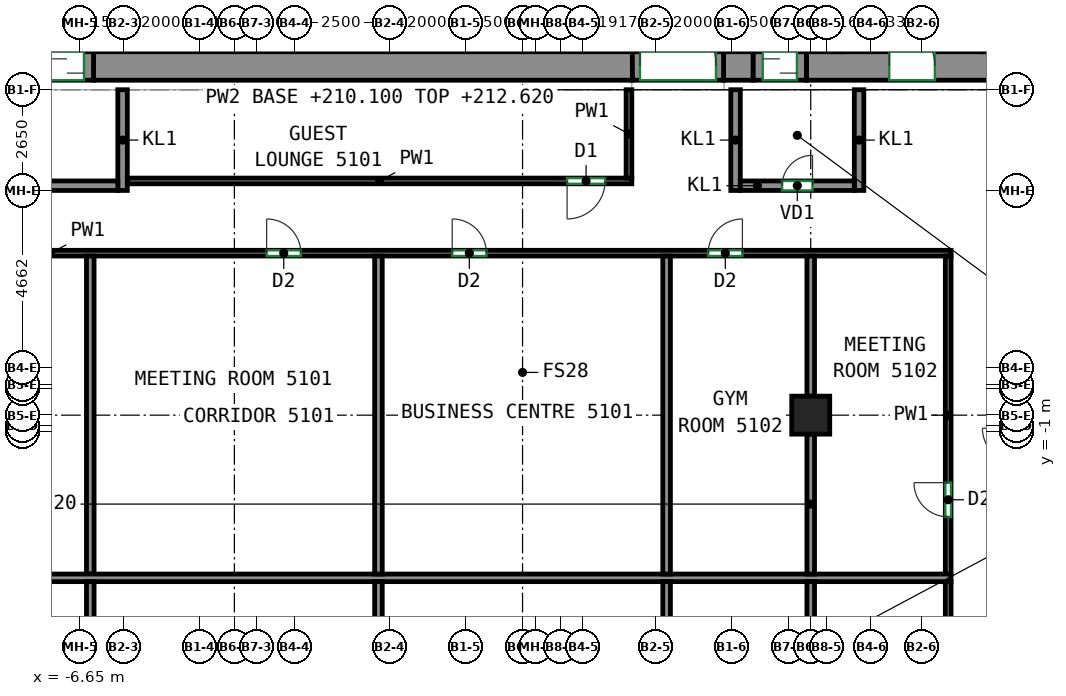
"""IFC4 building model, lengths in metres.
Left out: names, types, materials, properties, quantities, classifications, styles, units other than length and angle.
Written with IfcOpenShell. Run it as: python <this file> out.ifc"""

import sys

from ifc_helpers import new_model, si_unit, direction, frame, frame_2d, origin, origin_2d, place, context, subcontext, project, spatial, rectangle, extrude, source, transform, mapped, element, fill, save


model = new_model("IFC4")
c1 = context("Model", 3, precision=1e-05, world=origin(), true_north=direction((0.0, 1.0)))
c2 = subcontext(c1, "Body", "Model", "MODEL_VIEW")
j1 = project(units=[si_unit("LENGTHUNIT", "METRE"), si_unit("PLANEANGLEUNIT", "RADIAN")], contexts=[c1])
p1 = place(None, origin())
s1 = spatial("IfcSite", under=j1, at=p1, CompositionType="ELEMENT")
p2 = place(p1, origin())
s2 = spatial("IfcBuilding", under=s1, at=p2, CompositionType="ELEMENT")
p3 = place(p2, frame((0.0, 0.0, 210.1)))
s3 = spatial("IfcBuildingStorey", under=s2, at=p3, CompositionType="ELEMENT", Elevation=210.1)
m1 = source(origin(), c2, "Body", "SweptSolid", [
    extrude(rectangle(XDim=1.0, YDim=1.0, at=origin_2d()), origin(), (0.0, 0.0, 1.0), 3.12),
])
p4 = place(p3, frame((12.583, -0.562, 0.0), z_axis=(0.0, 0.0, 1.0), x_axis=(1.0, 0.0, 0.0)))
e1 = element("IfcColumn", 1, at=p4, inside=s3, PredefinedType="COLUMN", context=c2, shape_type="MappedRepresentation", body=[
    mapped(m1, transform((0.0, 0.0, 0.0))),
])
m2 = source(origin(), c2, "Body", "SweptSolid", [
    extrude(rectangle(XDim=14.18, YDim=0.75, at=frame_2d((7.09, 0.0))), origin(), (0.0, 0.0, 1.0), 3.12),
])
p5 = place(p3, frame((-6.29, 8.625, 0.0), z_axis=(0.0, 0.0, 1.0), x_axis=(1.0, 0.0, 0.0)))
e2 = element("IfcWall", 2, at=p5, inside=s3, PredefinedType="SHEAR", context=c2, shape_type="MappedRepresentation", body=[
    mapped(m2, transform((0.0, 0.0, 0.0))),
])
m3 = source(origin(), c2, "Body", "SweptSolid", [
    extrude(rectangle(XDim=0.78, YDim=0.75, at=frame_2d((0.39, 0.0))), origin(), (0.0, 0.0, 1.0), 3.12),
])
p6 = place(p3, frame((10.29, 8.625, 0.0), z_axis=(0.0, 0.0, 1.0), x_axis=(1.0, 0.0, 0.0)))
e3 = element("IfcWall", 3, at=p6, inside=s3, PredefinedType="SHEAR", context=c2, shape_type="MappedRepresentation", body=[
    mapped(m3, transform((0.0, 0.0, 0.0))),
])
m4 = source(origin(), c2, "Body", "SweptSolid", [
    extrude(rectangle(XDim=5.38, YDim=0.75, at=frame_2d((2.69, 0.0))), origin(), (0.0, 0.0, 1.0), 3.12),
])
p7 = place(p3, frame((12.47, 8.625, 0.0), z_axis=(0.0, 0.0, 1.0), x_axis=(1.0, 0.0, 0.0)))
e4 = element("IfcWall", 4, at=p7, inside=s3, PredefinedType="SHEAR", context=c2, shape_type="MappedRepresentation", body=[
    mapped(m4, transform((0.0, 0.0, 0.0))),
])
p8 = place(p7, frame((2.18, 0.0, 0.0)))
e5 = element("IfcOpeningElement", 5, at=p8, cuts=e4, PredefinedType="OPENING", context=c2, shape_type="SweptSolid", body=[
    extrude(rectangle(XDim=1.2, YDim=2.1, at=frame_2d((0.6, 1.05))), frame((0.0, 0.385, 0.0), z_axis=(0.0, -1.0, 0.0), x_axis=(1.0, 0.0, 0.0)), (0.0, 0.0, 1.0), 0.77),
])
m5 = source(origin(), c2, "Body", "SweptSolid", [
    extrude(rectangle(XDim=2.65, YDim=0.25, at=frame_2d((1.325, 0.0))), origin(), (0.0, 0.0, 1.0), 3.12),
])
p9 = place(p3, frame((-5.525, 5.35, 0.0), z_axis=(0.0, 0.0, 1.0), x_axis=(0.0, 1.0, 0.0)))
e6 = element("IfcWall", 6, at=p9, inside=s3, PredefinedType="PARTITIONING", context=c2, shape_type="MappedRepresentation", body=[
    mapped(m5, transform((0.0, 0.0, 0.0))),
])
m6 = source(origin(), c2, "Body", "SweptSolid", [
    extrude(rectangle(XDim=5.36, YDim=0.25, at=frame_2d((2.68, 0.0))), origin(), (0.0, 0.0, 1.0), 3.12),
])
p10 = place(p3, frame((-11.01, 5.475, 0.0), z_axis=(0.0, 0.0, 1.0), x_axis=(1.0, 0.0, 0.0)))
e7 = element("IfcWall", 7, at=p10, inside=s3, PredefinedType="PARTITIONING", context=c2, shape_type="MappedRepresentation", body=[
    mapped(m6, transform((0.0, 0.0, 0.0))),
])
p11 = place(p10, frame((2.28, 0.0, 0.0)))
e8 = element("IfcOpeningElement", 8, at=p11, cuts=e7, PredefinedType="OPENING", context=c2, shape_type="SweptSolid", body=[
    extrude(rectangle(XDim=0.8, YDim=2.0, at=frame_2d((0.4, 1.0))), frame((0.0, 0.135, 0.0), z_axis=(0.0, -1.0, 0.0), x_axis=(1.0, 0.0, 0.0)), (0.0, 0.0, 1.0), 0.27),
])
for number, where, z_axis, x_axis in (
    (9, (10.605, 5.35, 0.0), (0.0, 0.0, 1.0), (0.0, 1.0, 0.0)),
    (10, (13.855, 5.35, 0.0), (0.0, 0.0, 1.0), (0.0, 1.0, 0.0)),
):
    element("IfcWall", number, at=place(p3, frame(where, z_axis=z_axis, x_axis=x_axis)), inside=s3, PredefinedType="PARTITIONING", context=c2, shape_type="MappedRepresentation", body=[
        mapped(m5, transform((0.0, 0.0, 0.0))),
    ])
m7 = source(origin(), c2, "Body", "SweptSolid", [
    extrude(rectangle(XDim=3.0, YDim=0.25, at=frame_2d((1.5, 0.0))), origin(), (0.0, 0.0, 1.0), 3.12),
])
p12 = place(p3, frame((10.73, 5.475, 0.0), z_axis=(0.0, 0.0, 1.0), x_axis=(1.0, 0.0, 0.0)))
e11 = element("IfcWall", 11, at=p12, inside=s3, PredefinedType="PARTITIONING", context=c2, shape_type="MappedRepresentation", body=[
    mapped(m7, transform((0.0, 0.0, 0.0))),
])
p13 = place(p12, frame((1.1, 0.0, 0.0)))
e12 = element("IfcOpeningElement", 12, at=p13, cuts=e11, PredefinedType="OPENING", context=c2, shape_type="SweptSolid", body=[
    extrude(rectangle(XDim=0.8, YDim=2.0, at=frame_2d((0.4, 1.0))), frame((0.0, 0.135, 0.0), z_axis=(0.0, -1.0, 0.0), x_axis=(1.0, 0.0, 0.0)), (0.0, 0.0, 1.0), 0.27),
])
m8 = source(origin(), c2, "Body", "SweptSolid", [
    extrude(rectangle(XDim=1.4, YDim=0.75, at=frame_2d((0.7, 0.0))), origin(), (0.0, 0.0, 1.0), 2.7),
])
p14 = place(p3, frame((-7.69, 8.625, 0.0), z_axis=(0.0, 0.0, 1.0), x_axis=(1.0, 0.0, 0.0)))
e13 = element("IfcWall", 13, at=p14, inside=s3, PredefinedType="PARTITIONING", context=c2, shape_type="MappedRepresentation", body=[
    mapped(m8, transform((0.0, 0.0, 0.0))),
])
p15 = place(p14, frame((0.25, 0.0, 0.0)))
e14 = element("IfcOpeningElement", 14, at=p15, cuts=e13, PredefinedType="OPENING", context=c2, shape_type="SweptSolid", body=[
    extrude(rectangle(XDim=0.9, YDim=2.1, at=frame_2d((0.45, 1.05))), frame((0.0, 0.385, 0.0), z_axis=(0.0, -1.0, 0.0), x_axis=(1.0, 0.0, 0.0)), (0.0, 0.0, 1.0), 0.77),
])
m9 = source(origin(), c2, "Body", "SweptSolid", [
    extrude(rectangle(XDim=2.4, YDim=0.75, at=frame_2d((1.2, 0.0))), origin(), (0.0, 0.0, 1.0), 2.7),
])
p16 = place(p3, frame((7.89, 8.625, 0.0), z_axis=(0.0, 0.0, 1.0), x_axis=(1.0, 0.0, 0.0)))
e15 = element("IfcWall", 15, at=p16, inside=s3, PredefinedType="PARTITIONING", context=c2, shape_type="MappedRepresentation", body=[
    mapped(m9, transform((0.0, 0.0, 0.0))),
])
p17 = place(p16, frame((0.2, 0.0, 0.0)))
e16 = element("IfcOpeningElement", 16, at=p17, cuts=e15, PredefinedType="OPENING", context=c2, shape_type="SweptSolid", body=[
    extrude(rectangle(XDim=2.0, YDim=2.1, at=frame_2d((1.0, 1.05))), frame((0.0, 0.385, 0.0), z_axis=(0.0, -1.0, 0.0), x_axis=(1.0, 0.0, 0.0)), (0.0, 0.0, 1.0), 0.77),
])
p18 = place(p3, frame((11.07, 8.625, 0.0), z_axis=(0.0, 0.0, 1.0), x_axis=(1.0, 0.0, 0.0)))
e17 = element("IfcWall", 17, at=p18, inside=s3, PredefinedType="PARTITIONING", context=c2, shape_type="MappedRepresentation", body=[
    mapped(m8, transform((0.0, 0.0, 0.0))),
])
p19 = place(p18, frame((0.25, 0.0, 0.0)))
e18 = element("IfcOpeningElement", 18, at=p19, cuts=e17, PredefinedType="OPENING", context=c2, shape_type="SweptSolid", body=[
    extrude(rectangle(XDim=0.9, YDim=2.1, at=frame_2d((0.45, 1.05))), frame((0.0, 0.385, 0.0), z_axis=(0.0, -1.0, 0.0), x_axis=(1.0, 0.0, 0.0)), (0.0, 0.0, 1.0), 0.77),
])
p20 = place(p3, frame((7.875, 5.6, 0.0), z_axis=(0.0, 0.0, 1.0), x_axis=(-1.0, 0.0, 0.0)))
e19 = element("IfcWall", 19, at=p20, inside=s3, PredefinedType="PARTITIONING", context=c2, shape_type="SweptSolid", body=[
    extrude(rectangle(XDim=13.275, YDim=0.15, at=frame_2d((6.637, 0.0))), origin(), (0.0, 0.0, 1.0), 3.12),
])
p21 = place(p20, frame((0.703, 0.0, 0.0)))
e20 = element("IfcOpeningElement", 20, at=p21, cuts=e19, PredefinedType="OPENING", context=c2, shape_type="SweptSolid", body=[
    extrude(rectangle(XDim=1.0, YDim=2.1, at=frame_2d((0.5, 1.05))), frame((0.0, 0.085, 0.0), z_axis=(0.0, -1.0, 0.0), x_axis=(1.0, 0.0, 0.0)), (0.0, 0.0, 1.0), 0.17),
])
p22 = place(p3, frame((7.8, 8.0, 0.0), z_axis=(0.0, 0.0, 1.0), x_axis=(0.0, -1.0, 0.0)))
e21 = element("IfcWall", 21, at=p22, inside=s3, PredefinedType="PARTITIONING", context=c2, shape_type="SweptSolid", body=[
    extrude(rectangle(XDim=2.325, YDim=0.15, at=frame_2d((1.163, 0.0))), origin(), (0.0, 0.0, 1.0), 3.12),
])
p23 = place(p3, frame((-17.575, 3.7, 0.0), z_axis=(0.0, 0.0, 1.0), x_axis=(1.0, 0.0, 0.0)))
e22 = element("IfcWall", 22, at=p23, inside=s3, PredefinedType="PARTITIONING", context=c2, shape_type="SweptSolid", body=[
    extrude(rectangle(XDim=33.85, YDim=0.15, at=frame_2d((16.925, 0.0))), origin(), (0.0, 0.0, 1.0), 3.12),
])
p24 = place(p23, frame((1.902, 0.0, 0.0)))
e23 = element("IfcOpeningElement", 23, at=p24, cuts=e22, PredefinedType="OPENING", context=c2, shape_type="SweptSolid", body=[
    extrude(rectangle(XDim=0.9, YDim=2.1, at=frame_2d((0.45, 1.05))), frame((0.0, 0.085, 0.0), z_axis=(0.0, -1.0, 0.0), x_axis=(1.0, 0.0, 0.0)), (0.0, 0.0, 1.0), 0.17),
])
p25 = place(p23, frame((15.841, 0.0, 0.0)))
e24 = element("IfcOpeningElement", 24, at=p25, cuts=e22, PredefinedType="OPENING", context=c2, shape_type="SweptSolid", body=[
    extrude(rectangle(XDim=0.9, YDim=2.1, at=frame_2d((0.45, 1.05))), frame((0.0, 0.085, 0.0), z_axis=(0.0, -1.0, 0.0), x_axis=(1.0, 0.0, 0.0)), (0.0, 0.0, 1.0), 0.17),
])
p26 = place(p23, frame((20.724, 0.0, 0.0)))
e25 = element("IfcOpeningElement", 25, at=p26, cuts=e22, PredefinedType="OPENING", context=c2, shape_type="SweptSolid", body=[
    extrude(rectangle(XDim=0.9, YDim=2.1, at=frame_2d((0.45, 1.05))), frame((0.0, 0.085, 0.0), z_axis=(0.0, -1.0, 0.0), x_axis=(1.0, 0.0, 0.0)), (0.0, 0.0, 1.0), 0.17),
])
p27 = place(p23, frame((27.46, 0.0, 0.0)))
e26 = element("IfcOpeningElement", 26, at=p27, cuts=e22, PredefinedType="OPENING", context=c2, shape_type="SweptSolid", body=[
    extrude(rectangle(XDim=0.9, YDim=2.1, at=frame_2d((0.45, 1.05))), frame((0.0, 0.085, 0.0), z_axis=(0.0, -1.0, 0.0), x_axis=(1.0, 0.0, 0.0)), (0.0, 0.0, 1.0), 0.17),
])
p28 = place(p3, frame((16.2, -4.753, 0.0), z_axis=(0.0, 0.0, 1.0), x_axis=(0.0, 1.0, 0.0)))
e27 = element("IfcWall", 27, at=p28, inside=s3, PredefinedType="PARTITIONING", context=c2, shape_type="SweptSolid", body=[
    extrude(rectangle(XDim=8.378, YDim=0.15, at=frame_2d((4.189, 0.0))), origin(), (0.0, 0.0, 1.0), 3.12),
])
p29 = place(p28, frame((1.514, 0.0, 0.0)))
e28 = element("IfcOpeningElement", 28, at=p29, cuts=e27, PredefinedType="OPENING", context=c2, shape_type="SweptSolid", body=[
    extrude(rectangle(XDim=0.9, YDim=2.1, at=frame_2d((0.45, 1.05))), frame((0.0, 0.085, 0.0), z_axis=(0.0, -1.0, 0.0), x_axis=(1.0, 0.0, 0.0)), (0.0, 0.0, 1.0), 0.17),
])
p30 = place(p3, frame((16.2, -15.425, 0.0), z_axis=(0.0, 0.0, 1.0), x_axis=(0.0, 1.0, 0.0)))
e29 = element("IfcWall", 29, at=p30, inside=s3, PredefinedType="PARTITIONING", context=c2, shape_type="SweptSolid", body=[
    extrude(rectangle(XDim=10.492, YDim=0.15, at=frame_2d((5.246, 0.0))), origin(), (0.0, 0.0, 1.0), 3.12),
])
p31 = place(p30, frame((8.584, 0.0, 0.0)))
e30 = element("IfcOpeningElement", 30, at=p31, cuts=e29, PredefinedType="OPENING", context=c2, shape_type="SweptSolid", body=[
    extrude(rectangle(XDim=0.9, YDim=2.1, at=frame_2d((0.45, 1.05))), frame((0.0, 0.085, 0.0), z_axis=(0.0, -1.0, 0.0), x_axis=(1.0, 0.0, 0.0)), (0.0, 0.0, 1.0), 0.17),
])
p32 = place(p3, frame((-6.375, -4.743, 0.0), z_axis=(0.0, 0.0, 1.0), x_axis=(0.0, 1.0, 0.0)))
e31 = element("IfcWall", 31, at=p32, inside=s3, PredefinedType="PARTITIONING", context=c2, shape_type="SweptSolid", body=[
    extrude(rectangle(XDim=8.366, YDim=0.2, at=frame_2d((4.183, 0.0))), origin(), (0.0, 0.0, 1.0), 3.12),
])
p33 = place(p3, frame((-13.873, -4.843, 0.0), z_axis=(0.0, 0.0, 1.0), x_axis=(1.0, 0.0, 0.0)))
e32 = element("IfcWall", 32, at=p33, inside=s3, PredefinedType="PARTITIONING", context=c2, shape_type="SweptSolid", body=[
    extrude(rectangle(XDim=30.146, YDim=0.2, at=frame_2d((15.073, 0.0))), origin(), (0.0, 0.0, 1.0), 3.12),
])
for number, where, z_axis, x_axis in (
    (33, (1.208, -4.743, 0.0), (0.0, 0.0, 1.0), (0.0, 1.0, 0.0)),
    (34, (8.791, -4.743, 0.0), (0.0, 0.0, 1.0), (0.0, 1.0, 0.0)),
):
    element("IfcWall", number, at=place(p3, frame(where, z_axis=z_axis, x_axis=x_axis)), inside=s3, PredefinedType="PARTITIONING", context=c2, shape_type="SweptSolid", body=[
        extrude(rectangle(XDim=8.366, YDim=0.2, at=frame_2d((4.183, 0.0))), origin(), (0.0, 0.0, 1.0), 3.12),
    ])
p34 = place(p3, frame((12.583, -0.062, 0.0), z_axis=(0.0, 0.0, 1.0), x_axis=(0.0, 1.0, 0.0)))
e35 = element("IfcWall", 35, at=p34, inside=s3, PredefinedType="PARTITIONING", context=c2, shape_type="SweptSolid", body=[
    extrude(rectangle(XDim=3.685, YDim=0.2, at=frame_2d((1.843, 0.0))), origin(), (0.0, 0.0, 1.0), 3.12),
])
p35 = place(p3, frame((12.583, -4.743, 0.0), z_axis=(0.0, 0.0, 1.0), x_axis=(0.0, 1.0, 0.0)))
e36 = element("IfcWall", 36, at=p35, inside=s3, PredefinedType="PARTITIONING", context=c2, shape_type="SweptSolid", body=[
    extrude(rectangle(XDim=3.681, YDim=0.2, at=frame_2d((1.84, 0.0))), origin(), (0.0, 0.0, 1.0), 2.52),
])
for number, where, z_axis, x_axis in (
    (37, (-6.375, -15.423, 0.0), (0.0, 0.0, 1.0), (0.0, 1.0, 0.0)),
    (38, (1.208, -15.423, 0.0), (0.0, 0.0, 1.0), (0.0, 1.0, 0.0)),
    (39, (8.791, -15.423, 0.0), (0.0, 0.0, 1.0), (0.0, 1.0, 0.0)),
):
    element("IfcWall", number, at=place(p3, frame(where, z_axis=z_axis, x_axis=x_axis)), inside=s3, PredefinedType="PARTITIONING", context=c2, shape_type="SweptSolid", body=[
        extrude(rectangle(XDim=10.48, YDim=0.2, at=frame_2d((5.24, 0.0))), origin(), (0.0, 0.0, 1.0), 3.12),
    ])
p36 = place(p3, frame((12.583, -8.625, 0.0), z_axis=(0.0, 0.0, 1.0), x_axis=(0.0, 1.0, 0.0)))
e40 = element("IfcWall", 40, at=p36, inside=s3, PredefinedType="PARTITIONING", context=c2, shape_type="SweptSolid", body=[
    extrude(rectangle(XDim=3.682, YDim=0.2, at=frame_2d((1.841, 0.0))), origin(), (0.0, 0.0, 1.0), 2.52),
])
p37 = place(p17, origin())
e41 = element("IfcDoor", 41, at=p37, inside=s3, OperationType="DOUBLE_DOOR_SINGLE_SWING", PredefinedType="DOOR", context=c2, shape_type="SweptSolid", body=[
    extrude(rectangle(XDim=2.0, YDim=2.1, at=frame_2d((1.0, 1.05))), frame((0.0, 0.28, 0.0), z_axis=(0.0, -1.0, 0.0), x_axis=(1.0, 0.0, 0.0)), (0.0, 0.0, 1.0), 0.05),
])
fill(e16, e41)
p38 = place(p13, origin())
e42 = element("IfcDoor", 42, at=p38, inside=s3, OperationType="SINGLE_SWING_RIGHT", PredefinedType="DOOR", context=c2, shape_type="SweptSolid", body=[
    extrude(rectangle(XDim=0.8, YDim=2.0, at=frame_2d((0.4, 1.0))), frame((0.0, 0.025, 0.0), z_axis=(0.0, -1.0, 0.0), x_axis=(1.0, 0.0, 0.0)), (0.0, 0.0, 1.0), 0.05),
])
fill(e12, e42)
p39 = place(p15, origin())
e43 = element("IfcDoor", 43, at=p39, inside=s3, OperationType="SLIDING_TO_RIGHT", PredefinedType="DOOR", context=c2, shape_type="SweptSolid", body=[
    extrude(rectangle(XDim=0.9, YDim=2.1, at=frame_2d((0.45, 1.05))), frame((0.0, 0.28, 0.0), z_axis=(0.0, -1.0, 0.0), x_axis=(1.0, 0.0, 0.0)), (0.0, 0.0, 1.0), 0.05),
])
fill(e14, e43)
p40 = place(p19, origin())
e44 = element("IfcDoor", 44, at=p40, inside=s3, OperationType="SLIDING_TO_LEFT", PredefinedType="DOOR", context=c2, shape_type="SweptSolid", body=[
    extrude(rectangle(XDim=0.9, YDim=2.1, at=frame_2d((0.45, 1.05))), frame((0.0, 0.28, 0.0), z_axis=(0.0, -1.0, 0.0), x_axis=(1.0, 0.0, 0.0)), (0.0, 0.0, 1.0), 0.05),
])
fill(e18, e44)
p41 = place(p8, origin())
e45 = element("IfcDoor", 45, at=p41, inside=s3, OperationType="DOUBLE_DOOR_SINGLE_SWING", PredefinedType="DOOR", context=c2, shape_type="SweptSolid", body=[
    extrude(rectangle(XDim=1.2, YDim=2.1, at=frame_2d((0.6, 1.05))), frame((0.0, 0.28, 0.0), z_axis=(0.0, -1.0, 0.0), x_axis=(1.0, 0.0, 0.0)), (0.0, 0.0, 1.0), 0.05),
])
fill(e5, e45)
p42 = place(p29, origin())
e46 = element("IfcDoor", 46, at=p42, inside=s3, OperationType="SINGLE_SWING_RIGHT", PredefinedType="DOOR", context=c2, shape_type="SweptSolid", body=[
    extrude(rectangle(XDim=0.9, YDim=2.1, at=frame_2d((0.45, 1.05))), frame((0.0, 0.025, 0.0), z_axis=(0.0, -1.0, 0.0), x_axis=(1.0, 0.0, 0.0)), (0.0, 0.0, 1.0), 0.05),
])
fill(e28, e46)
p43 = place(p25, origin())
e47 = element("IfcDoor", 47, at=p43, inside=s3, OperationType="SINGLE_SWING_LEFT", PredefinedType="DOOR", context=c2, shape_type="SweptSolid", body=[
    extrude(rectangle(XDim=0.9, YDim=2.1, at=frame_2d((0.45, 1.05))), frame((0.0, 0.025, 0.0), z_axis=(0.0, -1.0, 0.0), x_axis=(1.0, 0.0, 0.0)), (0.0, 0.0, 1.0), 0.05),
])
fill(e24, e47)
p44 = place(p26, origin())
e48 = element("IfcDoor", 48, at=p44, inside=s3, OperationType="SINGLE_SWING_LEFT", PredefinedType="DOOR", context=c2, shape_type="SweptSolid", body=[
    extrude(rectangle(XDim=0.9, YDim=2.1, at=frame_2d((0.45, 1.05))), frame((0.0, 0.025, 0.0), z_axis=(0.0, -1.0, 0.0), x_axis=(1.0, 0.0, 0.0)), (0.0, 0.0, 1.0), 0.05),
])
fill(e25, e48)
p45 = place(p27, origin())
e49 = element("IfcDoor", 49, at=p45, inside=s3, OperationType="SINGLE_SWING_RIGHT", PredefinedType="DOOR", context=c2, shape_type="SweptSolid", body=[
    extrude(rectangle(XDim=0.9, YDim=2.1, at=frame_2d((0.45, 1.05))), frame((0.0, 0.025, 0.0), z_axis=(0.0, -1.0, 0.0), x_axis=(1.0, 0.0, 0.0)), (0.0, 0.0, 1.0), 0.05),
])
fill(e26, e49)
p46 = place(p21, origin())
e50 = element("IfcDoor", 50, at=p46, inside=s3, OperationType="SINGLE_SWING_RIGHT", PredefinedType="DOOR", context=c2, shape_type="SweptSolid", body=[
    extrude(rectangle(XDim=1.0, YDim=2.1, at=frame_2d((0.5, 1.05))), frame((0.0, 0.025, 0.0), z_axis=(0.0, -1.0, 0.0), x_axis=(1.0, 0.0, 0.0)), (0.0, 0.0, 1.0), 0.05),
])
fill(e20, e50)
save(model, sys.argv[1])
